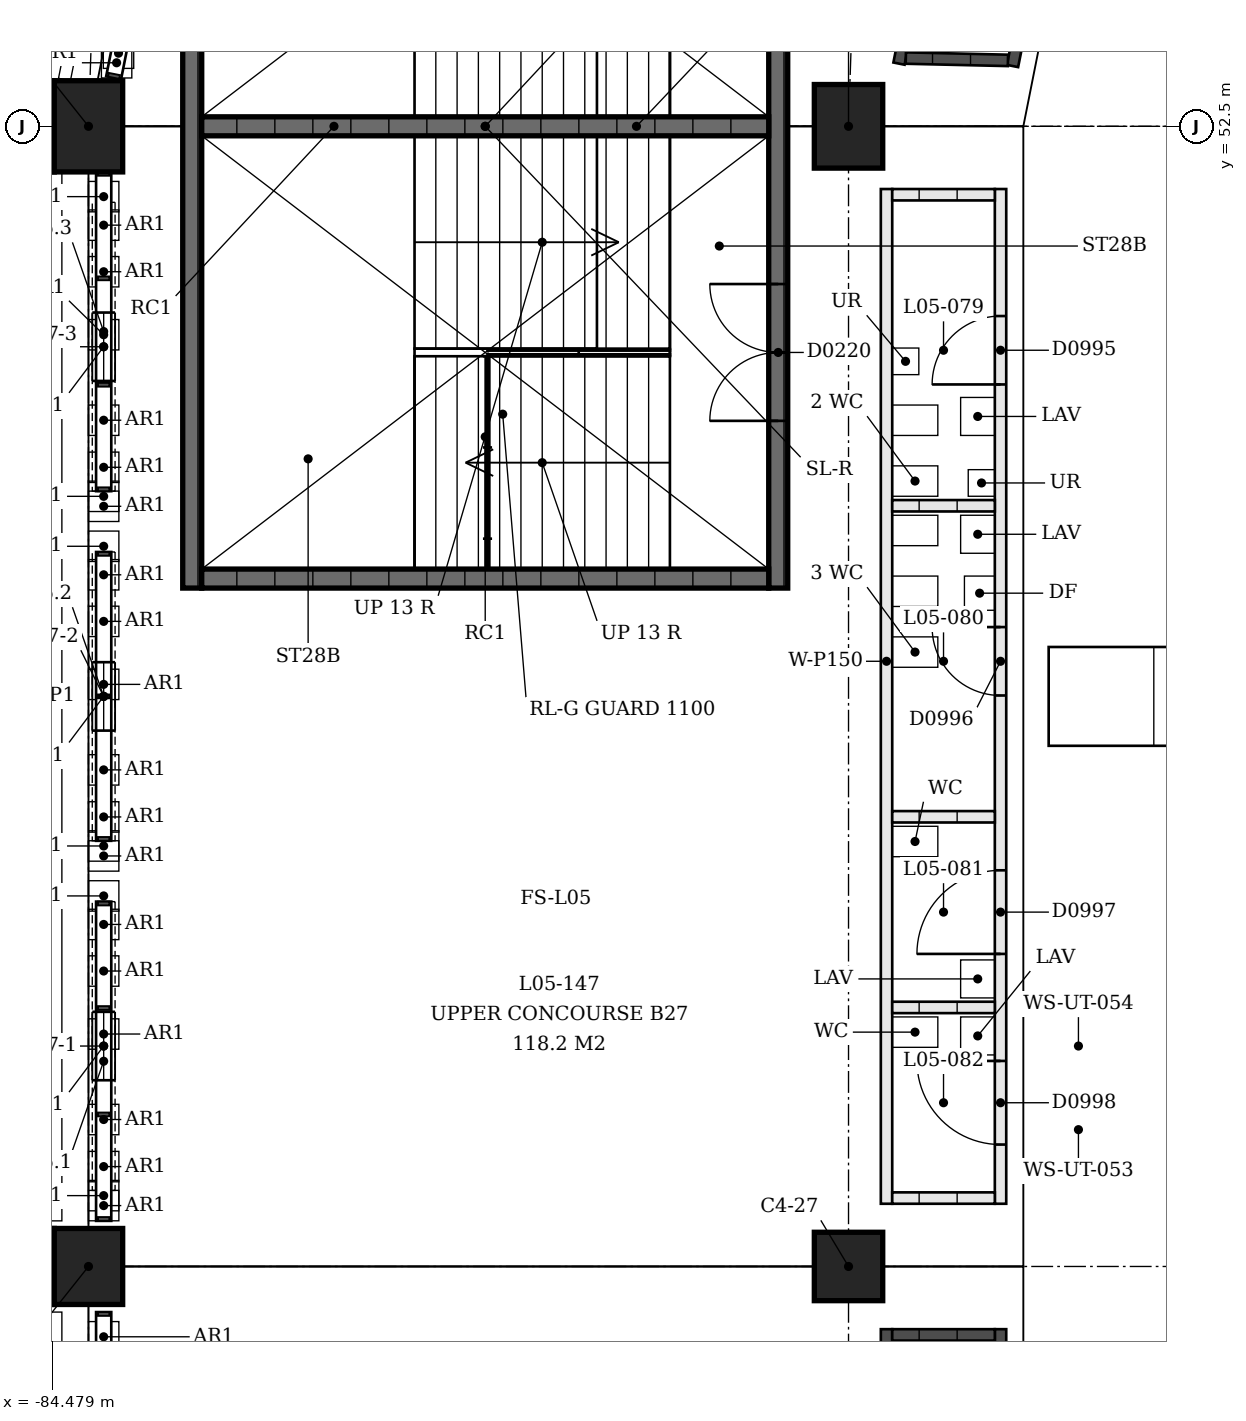
"""IFC4 building model, lengths in metres.
Left out: names, types, materials, properties, quantities, classifications, styles, units other than length and angle.
Written with IfcOpenShell. Run it as: python <this file> out.ifc"""

import sys

from ifc_helpers import new_model, si_unit, direction, frame, frame_2d, origin, origin_2d, place, context, subcontext, project, spatial, polyline, rectangle, outline, extrude, element, fill, save


model = new_model("IFC4")
c1 = context("Model", 3, precision=1e-05, world=origin(), true_north=direction((0.0, 1.0)))
c2 = subcontext(c1, "Body", "Model", "MODEL_VIEW")
j1 = project(units=[si_unit("LENGTHUNIT", "METRE"), si_unit("PLANEANGLEUNIT", "RADIAN")], contexts=[c1])
p1 = place(None, origin())
s1 = spatial("IfcSite", under=j1, at=p1, CompositionType="ELEMENT")
p2 = place(p1, origin())
s2 = spatial("IfcBuilding", under=s1, at=p2, CompositionType="ELEMENT")
p3 = place(p2, frame((0.0, 0.0, 22.5)))
s3 = spatial("IfcBuildingStorey", under=s2, at=p3, CompositionType="ELEMENT", Elevation=22.5)
p4 = place(p3, frame((-74.0, 37.5, 0.0), z_axis=(0.0, 0.0, 1.0), x_axis=(0.0, -1.0, 0.0)))
e1 = element("IfcColumn", 1, at=p4, inside=s3, PredefinedType="COLUMN", context=c2, shape_type="SweptSolid", body=[
    extrude(rectangle(XDim=0.9, YDim=0.9, at=origin_2d()), origin(), (0.0, 0.0, 1.0), 6.5),
])
p5 = place(p3, frame((-84.0, 37.5, 0.0), z_axis=(0.0, 0.0, 1.0), x_axis=(0.0, -1.0, 0.0)))
e2 = element("IfcColumn", 2, at=p5, inside=s3, PredefinedType="COLUMN", context=c2, shape_type="SweptSolid", body=[
    extrude(rectangle(XDim=1.0, YDim=0.9, at=origin_2d()), origin(), (0.0, 0.0, 1.0), 6.5),
])
p6 = place(p3, frame((-74.0, 52.5, 0.0), z_axis=(0.0, 0.0, 1.0), x_axis=(0.0, -1.0, 0.0)))
e3 = element("IfcColumn", 3, at=p6, inside=s3, PredefinedType="COLUMN", context=c2, shape_type="SweptSolid", body=[
    extrude(rectangle(XDim=1.1, YDim=0.9, at=origin_2d()), origin(), (0.0, 0.0, 1.0), 6.5),
])
p7 = place(p3, frame((-84.0, 52.5, 0.0), z_axis=(0.0, 0.0, 1.0), x_axis=(0.0, -1.0, 0.0)))
e4 = element("IfcColumn", 4, at=p7, inside=s3, PredefinedType="COLUMN", context=c2, shape_type="SweptSolid", body=[
    extrude(rectangle(XDim=1.2, YDim=0.9, at=origin_2d()), origin(), (0.0, 0.0, 1.0), 6.5),
])
p8 = place(p3, frame((-83.8, 38.5, 4.1), z_axis=(0.0, 0.0, 1.0), x_axis=(0.0, 1.0, 0.0)))
e5 = element("IfcWall", 5, at=p8, inside=s3, PredefinedType="SOLIDWALL", context=c2, shape_type="SweptSolid", body=[
    extrude(outline(polyline([(0.0, 0.0), (3.8, 0.0), (3.8, 0.05), (3.676, 1.314), (3.308, 2.581), (2.709, 3.757), (1.9, 4.8), (1.091, 3.757), (0.492, 2.581), (0.124, 1.314), (0.0, 0.05), (0.0, 0.0)])), frame((0.0, 0.15, 0.0), z_axis=(0.0, -1.0, 0.0), x_axis=(1.0, 0.0, 0.0)), (0.0, 0.0, 1.0), 0.3),
])
p9 = place(p8, frame((1.45, 0.0, 0.4)))
e6 = element("IfcOpeningElement", 6, at=p9, cuts=e5, PredefinedType="OPENING", context=c2, shape_type="SweptSolid", body=[
    extrude(rectangle(XDim=0.9, YDim=3.6, at=frame_2d((0.45, 1.8))), frame((0.0, 0.16, 0.0), z_axis=(0.0, -1.0, 0.0), x_axis=(1.0, 0.0, 0.0)), (0.0, 0.0, 1.0), 0.32),
])
p10 = place(p3, frame((-83.8, 43.1, 4.1), z_axis=(0.0, 0.0, 1.0), x_axis=(0.0, 1.0, 0.0)))
e7 = element("IfcWall", 7, at=p10, inside=s3, PredefinedType="SOLIDWALL", context=c2, shape_type="SweptSolid", body=[
    extrude(outline(polyline([(0.0, 0.0), (3.8, 0.0), (3.8, 0.05), (3.676, 1.314), (3.308, 2.581), (2.709, 3.757), (1.9, 4.8), (1.091, 3.757), (0.492, 2.581), (0.124, 1.314), (0.0, 0.05), (0.0, 0.0)])), frame((0.0, 0.15, 0.0), z_axis=(0.0, -1.0, 0.0), x_axis=(1.0, 0.0, 0.0)), (0.0, 0.0, 1.0), 0.3),
])
p11 = place(p10, frame((1.45, 0.0, 0.4)))
e8 = element("IfcOpeningElement", 8, at=p11, cuts=e7, PredefinedType="OPENING", context=c2, shape_type="SweptSolid", body=[
    extrude(rectangle(XDim=0.9, YDim=3.6, at=frame_2d((0.45, 1.8))), frame((0.0, 0.16, 0.0), z_axis=(0.0, -1.0, 0.0), x_axis=(1.0, 0.0, 0.0)), (0.0, 0.0, 1.0), 0.32),
])
p12 = place(p3, frame((-83.8, 47.7, 4.1), z_axis=(0.0, 0.0, 1.0), x_axis=(0.0, 1.0, 0.0)))
e9 = element("IfcWall", 9, at=p12, inside=s3, PredefinedType="SOLIDWALL", context=c2, shape_type="SweptSolid", body=[
    extrude(outline(polyline([(0.0, 0.0), (3.8, 0.0), (3.8, 0.05), (3.676, 1.314), (3.308, 2.581), (2.709, 3.757), (1.9, 4.8), (1.091, 3.757), (0.492, 2.581), (0.124, 1.314), (0.0, 0.05), (0.0, 0.0)])), frame((0.0, 0.15, 0.0), z_axis=(0.0, -1.0, 0.0), x_axis=(1.0, 0.0, 0.0)), (0.0, 0.0, 1.0), 0.3),
])
p13 = place(p12, frame((1.45, 0.0, 0.4)))
e10 = element("IfcOpeningElement", 10, at=p13, cuts=e9, PredefinedType="OPENING", context=c2, shape_type="SweptSolid", body=[
    extrude(rectangle(XDim=0.9, YDim=3.6, at=frame_2d((0.45, 1.8))), frame((0.0, 0.16, 0.0), z_axis=(0.0, -1.0, 0.0), x_axis=(1.0, 0.0, 0.0)), (0.0, 0.0, 1.0), 0.32),
])
p14 = place(p3, frame((-74.925, 58.575, 0.0), z_axis=(0.0, 0.0, 1.0), x_axis=(0.0, -1.0, 0.0)))
e11 = element("IfcWall", 11, at=p14, inside=s3, PredefinedType="SHEAR", context=c2, shape_type="SweptSolid", body=[
    extrude(rectangle(XDim=12.15, YDim=0.25, at=frame_2d((6.075, 0.0))), origin(), (0.0, 0.0, 1.0), 2.1),
])
p15 = place(p14, frame((2.2, 0.0, 0.0)))
e12 = element("IfcOpeningElement", 12, at=p15, cuts=e11, PredefinedType="OPENING", context=c2, shape_type="SweptSolid", body=[
    extrude(rectangle(XDim=1.8, YDim=2.1, at=frame_2d((0.9, 1.05))), frame((0.0, 0.125, 0.0), z_axis=(0.0, -1.0, 0.0), x_axis=(1.0, 0.0, 0.0)), (0.0, 0.0, 1.0), 0.25),
])
p16 = place(p14, frame((8.15, 0.0, 0.0)))
e13 = element("IfcOpeningElement", 13, at=p16, cuts=e11, PredefinedType="OPENING", context=c2, shape_type="SweptSolid", body=[
    extrude(rectangle(XDim=1.8, YDim=2.1, at=frame_2d((0.9, 1.05))), frame((0.0, 0.125, 0.0), z_axis=(0.0, -1.0, 0.0), x_axis=(1.0, 0.0, 0.0)), (0.0, 0.0, 1.0), 0.25),
])
p17 = place(p3, frame((-82.635, 58.575, 0.0), z_axis=(0.0, 0.0, 1.0), x_axis=(0.0, -1.0, 0.0)))
e14 = element("IfcWall", 14, at=p17, inside=s3, PredefinedType="SHEAR", context=c2, shape_type="SweptSolid", body=[
    extrude(rectangle(XDim=12.15, YDim=0.25, at=frame_2d((6.075, 0.0))), origin(), (0.0, 0.0, 1.0), 2.1),
])
for number, where, z_axis, x_axis in (
    (15, (-75.05, 46.55, 0.0), (0.0, 0.0, 1.0), (-1.0, 0.0, 0.0)),
    (16, (-75.05, 52.5, 0.0), (0.0, 0.0, 1.0), (-1.0, 0.0, 0.0)),
):
    element("IfcWall", number, at=place(p3, frame(where, z_axis=z_axis, x_axis=x_axis)), inside=s3, PredefinedType="SHEAR", context=c2, shape_type="SweptSolid", body=[
        extrude(rectangle(XDim=7.46, YDim=0.25, at=frame_2d((3.73, 0.0))), origin(), (0.0, 0.0, 1.0), 2.1),
    ])
p18 = place(p3, frame((-72.0, 23.325, 0.0), z_axis=(0.0, 0.0, 1.0), x_axis=(0.0, 1.0, 0.0)))
e17 = element("IfcWall", 17, at=p18, inside=s3, PredefinedType="SOLIDWALL", context=c2, shape_type="SweptSolid", body=[
    extrude(rectangle(XDim=13.35, YDim=0.15, at=frame_2d((6.675, 0.0))), origin(), (0.0, 0.0, 1.0), 3.0),
])
p19 = place(p18, frame((2.875, 0.0, 0.0)))
e18 = element("IfcOpeningElement", 18, at=p19, cuts=e17, PredefinedType="OPENING", context=c2, shape_type="SweptSolid", body=[
    extrude(rectangle(XDim=1.0, YDim=2.1, at=frame_2d((0.5, 1.05))), frame((0.0, 0.075, 0.0), z_axis=(0.0, -1.0, 0.0), x_axis=(1.0, 0.0, 0.0)), (0.0, 0.0, 1.0), 0.15),
])
p20 = place(p18, frame((9.475, 0.0, 0.0)))
e19 = element("IfcOpeningElement", 19, at=p20, cuts=e17, PredefinedType="OPENING", context=c2, shape_type="SweptSolid", body=[
    extrude(rectangle(XDim=1.0, YDim=2.1, at=frame_2d((0.5, 1.05))), frame((0.0, 0.075, 0.0), z_axis=(0.0, -1.0, 0.0), x_axis=(1.0, 0.0, 0.0)), (0.0, 0.0, 1.0), 0.15),
])
p21 = place(p3, frame((-73.5, 23.325, 0.0), z_axis=(0.0, 0.0, 1.0), x_axis=(0.0, 1.0, 0.0)))
e20 = element("IfcWall", 20, at=p21, inside=s3, PredefinedType="SOLIDWALL", context=c2, shape_type="SweptSolid", body=[
    extrude(rectangle(XDim=13.35, YDim=0.15, at=frame_2d((6.675, 0.0))), origin(), (0.0, 0.0, 1.0), 3.0),
])
p22 = place(p3, frame((-72.075, 36.6, 0.0), z_axis=(0.0, 0.0, 1.0), x_axis=(-1.0, 0.0, 0.0)))
e21 = element("IfcWall", 21, at=p22, inside=s3, PredefinedType="SOLIDWALL", context=c2, shape_type="SweptSolid", body=[
    extrude(rectangle(XDim=1.35, YDim=0.15, at=frame_2d((0.675, 0.0))), origin(), (0.0, 0.0, 1.0), 3.0),
])
p23 = place(p3, frame((-72.0, 51.675, 0.0), z_axis=(0.0, 0.0, 1.0), x_axis=(0.0, -1.0, 0.0)))
e22 = element("IfcWall", 22, at=p23, inside=s3, PredefinedType="PARTITIONING", context=c2, shape_type="SweptSolid", body=[
    extrude(rectangle(XDim=13.35, YDim=0.15, at=frame_2d((6.675, 0.0))), origin(), (0.0, 0.0, 1.0), 3.0),
])
p24 = place(p23, frame((1.671, 0.0, 0.0)))
e23 = element("IfcOpeningElement", 23, at=p24, cuts=e22, PredefinedType="OPENING", context=c2, shape_type="SweptSolid", body=[
    extrude(rectangle(XDim=0.9, YDim=2.1, at=frame_2d((0.45, 1.05))), frame((0.0, 0.075, 0.0), z_axis=(0.0, -1.0, 0.0), x_axis=(1.0, 0.0, 0.0)), (0.0, 0.0, 1.0), 0.15),
])
p25 = place(p23, frame((5.763, 0.0, 0.0)))
e24 = element("IfcOpeningElement", 24, at=p25, cuts=e22, PredefinedType="OPENING", context=c2, shape_type="SweptSolid", body=[
    extrude(rectangle(XDim=0.9, YDim=2.1, at=frame_2d((0.45, 1.05))), frame((0.0, 0.075, 0.0), z_axis=(0.0, -1.0, 0.0), x_axis=(1.0, 0.0, 0.0)), (0.0, 0.0, 1.0), 0.15),
])
p26 = place(p23, frame((8.963, 0.0, 0.0)))
e25 = element("IfcOpeningElement", 25, at=p26, cuts=e22, PredefinedType="OPENING", context=c2, shape_type="SweptSolid", body=[
    extrude(rectangle(XDim=1.1, YDim=2.1, at=frame_2d((0.55, 1.05))), frame((0.0, 0.075, 0.0), z_axis=(0.0, -1.0, 0.0), x_axis=(1.0, 0.0, 0.0)), (0.0, 0.0, 1.0), 0.15),
])
p27 = place(p23, frame((11.471, 0.0, 0.0)))
e26 = element("IfcOpeningElement", 26, at=p27, cuts=e22, PredefinedType="OPENING", context=c2, shape_type="SweptSolid", body=[
    extrude(rectangle(XDim=1.1, YDim=2.1, at=frame_2d((0.55, 1.05))), frame((0.0, 0.075, 0.0), z_axis=(0.0, -1.0, 0.0), x_axis=(1.0, 0.0, 0.0)), (0.0, 0.0, 1.0), 0.15),
])
p28 = place(p3, frame((-73.5, 51.675, 0.0), z_axis=(0.0, 0.0, 1.0), x_axis=(0.0, -1.0, 0.0)))
e27 = element("IfcWall", 27, at=p28, inside=s3, PredefinedType="PARTITIONING", context=c2, shape_type="SweptSolid", body=[
    extrude(rectangle(XDim=13.35, YDim=0.15, at=frame_2d((6.675, 0.0))), origin(), (0.0, 0.0, 1.0), 3.0),
])
for number, where, z_axis, x_axis in (
    (28, (-72.075, 51.6, 0.0), (0.0, 0.0, 1.0), (-1.0, 0.0, 0.0)),
    (29, (-72.075, 47.508, 0.0), (0.0, 0.0, 1.0), (-1.0, 0.0, 0.0)),
    (30, (-72.075, 43.416, 0.0), (0.0, 0.0, 1.0), (-1.0, 0.0, 0.0)),
    (31, (-72.075, 40.908, 0.0), (0.0, 0.0, 1.0), (-1.0, 0.0, 0.0)),
    (32, (-72.075, 38.4, 0.0), (0.0, 0.0, 1.0), (-1.0, 0.0, 0.0)),
):
    element("IfcWall", number, at=place(p3, frame(where, z_axis=z_axis, x_axis=x_axis)), inside=s3, PredefinedType="PARTITIONING", context=c2, shape_type="SweptSolid", body=[
        extrude(rectangle(XDim=1.35, YDim=0.15, at=frame_2d((0.675, 0.0))), origin(), (0.0, 0.0, 1.0), 3.0),
    ])
p29 = place(p3, frame((-71.842, 53.293, 0.0), z_axis=(0.0, 0.0, 1.0), x_axis=(0.195095631841, 0.980784224198, 0.0)))
e33 = element("IfcWall", 33, at=p29, inside=s3, PredefinedType="SOLIDWALL", context=c2, shape_type="SweptSolid", body=[
    extrude(rectangle(XDim=13.113, YDim=0.15, at=frame_2d((6.557, 0.0))), origin(), (0.0, 0.0, 1.0), 3.0),
])
p30 = place(p29, frame((2.815, 0.0, 0.0)))
e34 = element("IfcOpeningElement", 34, at=p30, cuts=e33, PredefinedType="OPENING", context=c2, shape_type="SweptSolid", body=[
    extrude(rectangle(XDim=1.0, YDim=2.1, at=frame_2d((0.5, 1.05))), frame((0.0, 0.075, 0.0), z_axis=(0.0, -1.0, 0.0), x_axis=(1.0, 0.0, 0.0)), (0.0, 0.0, 1.0), 0.15),
])
p31 = place(p29, frame((9.298, 0.0, 0.0)))
e35 = element("IfcOpeningElement", 35, at=p31, cuts=e33, PredefinedType="OPENING", context=c2, shape_type="SweptSolid", body=[
    extrude(rectangle(XDim=1.0, YDim=2.1, at=frame_2d((0.5, 1.05))), frame((0.0, 0.075, 0.0), z_axis=(0.0, -1.0, 0.0), x_axis=(1.0, 0.0, 0.0)), (0.0, 0.0, 1.0), 0.15),
])
p32 = place(p3, frame((-73.336, 53.325, 0.0), z_axis=(0.0, 0.0, 1.0), x_axis=(0.195086146928, 0.980786110871, 0.0)))
e36 = element("IfcWall", 36, at=p32, inside=s3, PredefinedType="SOLIDWALL", context=c2, shape_type="SweptSolid", body=[
    extrude(rectangle(XDim=13.631, YDim=0.15, at=frame_2d((6.815, 0.0))), origin(), (0.0, 0.0, 1.0), 3.0),
])
p33 = place(p3, frame((-71.903, 53.367, 0.0), z_axis=(0.0, 0.0, 1.0), x_axis=(-0.999738070999, 0.022886445666, 0.0)))
e37 = element("IfcWall", 37, at=p33, inside=s3, PredefinedType="SOLIDWALL", context=c2, shape_type="SweptSolid", body=[
    extrude(rectangle(XDim=1.344, YDim=0.15, at=frame_2d((0.672, 0.0))), origin(), (0.0, 0.0, 1.0), 3.0),
])
p34 = place(p9, origin())
e38 = element("IfcWindow", 38, at=p34, inside=s3, PartitioningType="SINGLE_PANEL", PredefinedType="WINDOW", context=c2, shape_type="SweptSolid", body=[
    extrude(rectangle(XDim=0.9, YDim=3.6, at=frame_2d((0.45, 1.8))), frame((0.0, 0.03, 0.0), z_axis=(0.0, -1.0, 0.0), x_axis=(1.0, 0.0, 0.0)), (0.0, 0.0, 1.0), 0.06),
])
fill(e6, e38)
p35 = place(p11, origin())
e39 = element("IfcWindow", 39, at=p35, inside=s3, PartitioningType="SINGLE_PANEL", PredefinedType="WINDOW", context=c2, shape_type="SweptSolid", body=[
    extrude(rectangle(XDim=0.9, YDim=3.6, at=frame_2d((0.45, 1.8))), frame((0.0, 0.03, 0.0), z_axis=(0.0, -1.0, 0.0), x_axis=(1.0, 0.0, 0.0)), (0.0, 0.0, 1.0), 0.06),
])
fill(e8, e39)
p36 = place(p13, origin())
e40 = element("IfcWindow", 40, at=p36, inside=s3, PartitioningType="SINGLE_PANEL", PredefinedType="WINDOW", context=c2, shape_type="SweptSolid", body=[
    extrude(rectangle(XDim=0.9, YDim=3.6, at=frame_2d((0.45, 1.8))), frame((0.0, 0.03, 0.0), z_axis=(0.0, -1.0, 0.0), x_axis=(1.0, 0.0, 0.0)), (0.0, 0.0, 1.0), 0.06),
])
fill(e10, e40)
p37 = place(p16, origin())
e41 = element("IfcDoor", 41, at=p37, inside=s3, OperationType="DOUBLE_DOOR_SINGLE_SWING", PredefinedType="DOOR", context=c2, shape_type="SweptSolid", body=[
    extrude(rectangle(XDim=1.8, YDim=2.1, at=frame_2d((0.9, 1.05))), frame((0.0, 0.025, 0.0), z_axis=(0.0, -1.0, 0.0), x_axis=(1.0, 0.0, 0.0)), (0.0, 0.0, 1.0), 0.05),
])
fill(e13, e41)
p38 = place(p24, origin())
e42 = element("IfcDoor", 42, at=p38, inside=s3, OperationType="SINGLE_SWING_RIGHT", PredefinedType="DOOR", context=c2, shape_type="SweptSolid", body=[
    extrude(rectangle(XDim=0.9, YDim=2.1, at=frame_2d((0.45, 1.05))), frame((0.0, 0.025, 0.0), z_axis=(0.0, -1.0, 0.0), x_axis=(1.0, 0.0, 0.0)), (0.0, 0.0, 1.0), 0.05),
])
fill(e23, e42)
p39 = place(p25, origin())
e43 = element("IfcDoor", 43, at=p39, inside=s3, OperationType="SINGLE_SWING_LEFT", PredefinedType="DOOR", context=c2, shape_type="SweptSolid", body=[
    extrude(rectangle(XDim=0.9, YDim=2.1, at=frame_2d((0.45, 1.05))), frame((0.0, 0.025, 0.0), z_axis=(0.0, -1.0, 0.0), x_axis=(1.0, 0.0, 0.0)), (0.0, 0.0, 1.0), 0.05),
])
fill(e24, e43)
p40 = place(p26, origin())
e44 = element("IfcDoor", 44, at=p40, inside=s3, OperationType="SINGLE_SWING_RIGHT", PredefinedType="DOOR", context=c2, shape_type="SweptSolid", body=[
    extrude(rectangle(XDim=1.1, YDim=2.1, at=frame_2d((0.55, 1.05))), frame((0.0, 0.025, 0.0), z_axis=(0.0, -1.0, 0.0), x_axis=(1.0, 0.0, 0.0)), (0.0, 0.0, 1.0), 0.05),
])
fill(e25, e44)
p41 = place(p27, origin())
e45 = element("IfcDoor", 45, at=p41, inside=s3, OperationType="SINGLE_SWING_LEFT", PredefinedType="DOOR", context=c2, shape_type="SweptSolid", body=[
    extrude(rectangle(XDim=1.1, YDim=2.1, at=frame_2d((0.55, 1.05))), frame((0.0, 0.025, 0.0), z_axis=(0.0, -1.0, 0.0), x_axis=(1.0, 0.0, 0.0)), (0.0, 0.0, 1.0), 0.05),
])
fill(e26, e45)
save(model, sys.argv[1])
